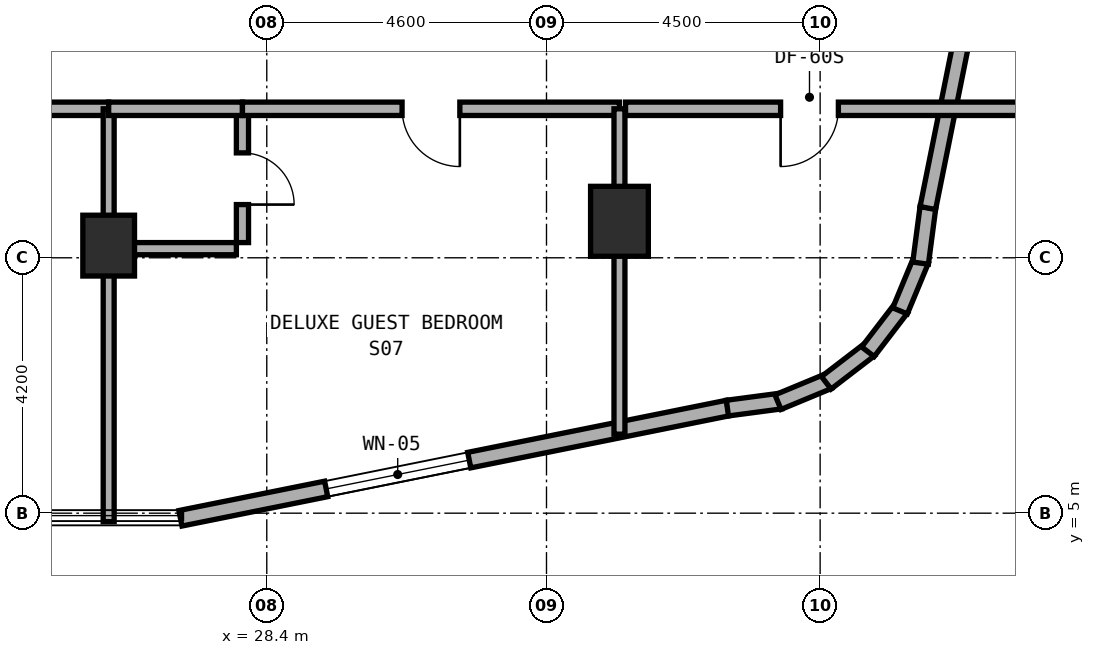
"""IFC4 building model, lengths in metres.
Left out: names, types, materials, properties, quantities, classifications, styles, units other than length and angle.
Written with IfcOpenShell. Run it as: python <this file> out.ifc"""

import sys

from ifc_helpers import new_model, si_unit, direction, frame, frame_2d, origin, origin_2d, place, context, subcontext, project, spatial, rectangle, extrude, element, fill, save


model = new_model("IFC4")
c1 = context("Model", 3, precision=1e-05, world=origin(), true_north=direction((0.0, 1.0)))
c2 = subcontext(c1, "Body", "Model", "MODEL_VIEW")
j1 = project(units=[si_unit("LENGTHUNIT", "METRE"), si_unit("PLANEANGLEUNIT", "RADIAN")], contexts=[c1])
p1 = place(None, origin())
s1 = spatial("IfcSite", under=j1, at=p1, CompositionType="ELEMENT")
p2 = place(p1, origin())
s2 = spatial("IfcBuilding", under=s1, at=p2, CompositionType="ELEMENT")
p3 = place(p2, frame((0.0, 0.0, 98.5)))
s3 = spatial("IfcBuildingStorey", under=s2, at=p3, CompositionType="ELEMENT", Elevation=98.5)
p4 = place(p3, frame((25.8, 9.4, 0.0), z_axis=(0.0, 0.0, 1.0), x_axis=(1.0, 0.0, 0.0)))
e1 = element("IfcColumn", 1, at=p4, inside=s3, PredefinedType="COLUMN", context=c2, shape_type="SweptSolid", body=[
    extrude(rectangle(XDim=0.85, YDim=1.0, at=origin_2d()), origin(), (0.0, 0.0, 1.0), 3.5),
])
p5 = place(p3, frame((34.2, 9.8, 0.0), z_axis=(0.0, 0.0, 1.0), x_axis=(1.0, 0.0, 0.0)))
e2 = element("IfcColumn", 2, at=p5, inside=s3, PredefinedType="COLUMN", context=c2, shape_type="SweptSolid", body=[
    extrude(rectangle(XDim=0.95, YDim=1.15, at=origin_2d()), origin(), (0.0, 0.0, 1.0), 3.5),
])
p6 = place(p3, frame((26.98, 4.916, 0.0), z_axis=(0.0, 0.0, 1.0), x_axis=(0.980315963543, 0.197435082048, 0.0)))
e3 = element("IfcWall", 3, at=p6, inside=s3, PredefinedType="STANDARD", context=c2, shape_type="SweptSolid", body=[
    extrude(rectangle(XDim=9.183, YDim=0.26, at=frame_2d((4.591, 0.0))), origin(), (0.0, 0.0, 1.0), 3.22),
])
p7 = place(p6, frame((2.445, 0.0, 0.8)))
e4 = element("IfcOpeningElement", 4, at=p7, cuts=e3, PredefinedType="OPENING", context=c2, shape_type="SweptSolid", body=[
    extrude(rectangle(XDim=2.4, YDim=1.6, at=frame_2d((1.2, 0.8))), frame((0.0, 0.14, 0.0), z_axis=(0.0, -1.0, 0.0), x_axis=(1.0, 0.0, 0.0)), (0.0, 0.0, 1.0), 0.28),
])
p8 = place(p3, frame((35.975, 6.728, 0.0), z_axis=(0.0, 0.0, 1.0), x_axis=(0.991388484223, 0.130953706898, 0.0)))
e5 = element("IfcWall", 5, at=p8, inside=s3, PredefinedType="STANDARD", context=c2, shape_type="SweptSolid", body=[
    extrude(rectangle(XDim=0.885, YDim=0.26, at=frame_2d((0.443, 0.0))), origin(), (0.0, 0.0, 1.0), 3.22),
])
p9 = place(p3, frame((36.807, 6.826, 0.0), z_axis=(0.0, 0.0, 1.0), x_axis=(0.923627776508, 0.383290660547, 0.0)))
e6 = element("IfcWall", 6, at=p9, inside=s3, PredefinedType="STANDARD", context=c2, shape_type="SweptSolid", body=[
    extrude(rectangle(XDim=0.903, YDim=0.26, at=frame_2d((0.452, 0.0))), origin(), (0.0, 0.0, 1.0), 3.22),
])
p10 = place(p3, frame((37.601, 7.144, 0.0), z_axis=(0.0, 0.0, 1.0), x_axis=(0.793458244748, 0.608624690463, 0.0)))
e7 = element("IfcWall", 7, at=p10, inside=s3, PredefinedType="STANDARD", context=c2, shape_type="SweptSolid", body=[
    extrude(rectangle(XDim=0.902, YDim=0.26, at=frame_2d((0.451, 0.0))), origin(), (0.0, 0.0, 1.0), 3.22),
])
p11 = place(p3, frame((38.286, 7.655, 0.0), z_axis=(0.0, 0.0, 1.0), x_axis=(0.608494022858, 0.793558456666, 0.0)))
e8 = element("IfcWall", 8, at=p11, inside=s3, PredefinedType="STANDARD", context=c2, shape_type="SweptSolid", body=[
    extrude(rectangle(XDim=0.902, YDim=0.26, at=frame_2d((0.451, 0.0))), origin(), (0.0, 0.0, 1.0), 3.22),
])
p12 = place(p3, frame((38.814, 8.327, 0.0), z_axis=(0.0, 0.0, 1.0), x_axis=(0.383155708213, 0.923683767999, 0.0)))
e9 = element("IfcWall", 9, at=p12, inside=s3, PredefinedType="STANDARD", context=c2, shape_type="SweptSolid", body=[
    extrude(rectangle(XDim=0.903, YDim=0.26, at=frame_2d((0.451, 0.0))), origin(), (0.0, 0.0, 1.0), 3.22),
])
p13 = place(p3, frame((39.152, 9.112, 0.0), z_axis=(0.0, 0.0, 1.0), x_axis=(0.130200706103, 0.991487658083, 0.0)))
e10 = element("IfcWall", 10, at=p13, inside=s3, PredefinedType="STANDARD", context=c2, shape_type="SweptSolid", body=[
    extrude(rectangle(XDim=0.921, YDim=0.26, at=frame_2d((0.46, 0.0))), origin(), (0.0, 0.0, 1.0), 3.22),
])
p14 = place(p3, frame((39.271, 10.018, 0.0), z_axis=(0.0, 0.0, 1.0), x_axis=(0.197435082048, 0.980315963543, 0.0)))
e11 = element("IfcWall", 11, at=p14, inside=s3, PredefinedType="STANDARD", context=c2, shape_type="SweptSolid", body=[
    extrude(rectangle(XDim=9.183, YDim=0.26, at=frame_2d((4.591, 0.0))), origin(), (0.0, 0.0, 1.0), 3.22),
])
p15 = place(p14, frame((4.286, 0.0, 0.8)))
e12 = element("IfcOpeningElement", 12, at=p15, cuts=e11, PredefinedType="OPENING", context=c2, shape_type="SweptSolid", body=[
    extrude(rectangle(XDim=2.4, YDim=1.6, at=frame_2d((1.2, 0.8))), frame((0.0, 0.14, 0.0), z_axis=(0.0, -1.0, 0.0), x_axis=(1.0, 0.0, 0.0)), (0.0, 0.0, 1.0), 0.28),
])
p16 = place(p3, frame((18.4, 11.65, 0.0), z_axis=(0.0, 0.0, 1.0), x_axis=(1.0, 0.0, 0.0)))
e13 = element("IfcWall", 13, at=p16, inside=s3, PredefinedType="SOLIDWALL", context=c2, shape_type="SweptSolid", body=[
    extrude(rectangle(XDim=7.4, YDim=0.22, at=frame_2d((3.7, 0.0))), origin(), (0.0, 0.0, 1.0), 2.595),
])
p17 = place(p16, frame((3.225, 0.0, 0.0)))
e14 = element("IfcOpeningElement", 14, at=p17, cuts=e13, PredefinedType="OPENING", context=c2, shape_type="SweptSolid", body=[
    extrude(rectangle(XDim=0.95, YDim=2.1, at=frame_2d((0.475, 1.05))), frame((0.0, 0.12, 0.0), z_axis=(0.0, -1.0, 0.0), x_axis=(1.0, 0.0, 0.0)), (0.0, 0.0, 1.0), 0.24),
])
p18 = place(p3, frame((25.8, 4.86, 0.0), z_axis=(0.0, 0.0, 1.0), x_axis=(0.0, 1.0, 0.0)))
e15 = element("IfcWall", 15, at=p18, inside=s3, PredefinedType="SOLIDWALL", context=c2, shape_type="SweptSolid", body=[
    extrude(rectangle(XDim=6.79, YDim=0.18, at=frame_2d((3.395, 0.0))), origin(), (0.0, 0.0, 1.0), 2.595),
])
p19 = place(p3, frame((28.0, 9.45, 0.0), z_axis=(0.0, 0.0, 1.0), x_axis=(0.0, 1.0, 0.0)))
e16 = element("IfcWall", 16, at=p19, inside=s3, PredefinedType="PLUMBINGWALL", context=c2, shape_type="SweptSolid", body=[
    extrude(rectangle(XDim=2.1, YDim=0.2, at=frame_2d((1.05, 0.0))), origin(), (0.0, 0.0, 1.0), 2.835),
])
p20 = place(p19, frame((0.625, 0.0, 0.0)))
e17 = element("IfcOpeningElement", 17, at=p20, cuts=e16, PredefinedType="OPENING", context=c2, shape_type="SweptSolid", body=[
    extrude(rectangle(XDim=0.85, YDim=2.1, at=frame_2d((0.425, 1.05))), frame((0.0, 0.11, 0.0), z_axis=(0.0, -1.0, 0.0), x_axis=(1.0, 0.0, 0.0)), (0.0, 0.0, 1.0), 0.22),
])
p21 = place(p3, frame((25.9, 9.35, 0.0), z_axis=(0.0, 0.0, 1.0), x_axis=(1.0, 0.0, 0.0)))
e18 = element("IfcWall", 18, at=p21, inside=s3, PredefinedType="PLUMBINGWALL", context=c2, shape_type="SweptSolid", body=[
    extrude(rectangle(XDim=2.0, YDim=0.2, at=frame_2d((1.0, 0.0))), origin(), (0.0, 0.0, 1.0), 2.835),
])
p22 = place(p3, frame((25.8, 11.65, 0.0), z_axis=(0.0, 0.0, 1.0), x_axis=(1.0, 0.0, 0.0)))
e19 = element("IfcWall", 19, at=p22, inside=s3, PredefinedType="SOLIDWALL", context=c2, shape_type="SweptSolid", body=[
    extrude(rectangle(XDim=2.2, YDim=0.22, at=frame_2d((1.1, 0.0))), origin(), (0.0, 0.0, 1.0), 2.595),
])
p23 = place(p3, frame((28.0, 11.65, 0.0), z_axis=(0.0, 0.0, 1.0), x_axis=(1.0, 0.0, 0.0)))
e20 = element("IfcWall", 20, at=p23, inside=s3, PredefinedType="SOLIDWALL", context=c2, shape_type="SweptSolid", body=[
    extrude(rectangle(XDim=6.2, YDim=0.22, at=frame_2d((3.1, 0.0))), origin(), (0.0, 0.0, 1.0), 2.595),
])
p24 = place(p23, frame((2.625, 0.0, 0.0)))
e21 = element("IfcOpeningElement", 21, at=p24, cuts=e20, PredefinedType="OPENING", context=c2, shape_type="SweptSolid", body=[
    extrude(rectangle(XDim=0.95, YDim=2.1, at=frame_2d((0.475, 1.05))), frame((0.0, 0.12, 0.0), z_axis=(0.0, -1.0, 0.0), x_axis=(1.0, 0.0, 0.0)), (0.0, 0.0, 1.0), 0.24),
])
p25 = place(p3, frame((34.2, 6.299, 0.0), z_axis=(0.0, 0.0, 1.0), x_axis=(0.0, 1.0, 0.0)))
e22 = element("IfcWall", 22, at=p25, inside=s3, PredefinedType="SOLIDWALL", context=c2, shape_type="SweptSolid", body=[
    extrude(rectangle(XDim=5.351, YDim=0.18, at=frame_2d((2.675, 0.0))), origin(), (0.0, 0.0, 1.0), 2.595),
])
p26 = place(p3, frame((34.3, 11.65, 0.0), z_axis=(0.0, 0.0, 1.0), x_axis=(1.0, 0.0, 0.0)))
e23 = element("IfcWall", 23, at=p26, inside=s3, PredefinedType="SOLIDWALL", context=c2, shape_type="SweptSolid", body=[
    extrude(rectangle(XDim=6.64, YDim=0.22, at=frame_2d((3.32, 0.0))), origin(), (0.0, 0.0, 1.0), 2.835),
])
p27 = place(p26, frame((2.55, 0.0, 0.0)))
e24 = element("IfcOpeningElement", 24, at=p27, cuts=e23, PredefinedType="OPENING", context=c2, shape_type="SweptSolid", body=[
    extrude(rectangle(XDim=0.95, YDim=2.1, at=frame_2d((0.475, 1.05))), frame((0.0, 0.12, 0.0), z_axis=(0.0, -1.0, 0.0), x_axis=(1.0, 0.0, 0.0)), (0.0, 0.0, 1.0), 0.24),
])
p28 = place(p7, origin())
e25 = element("IfcWindow", 25, at=p28, inside=s3, PartitioningType="SINGLE_PANEL", PredefinedType="WINDOW", context=c2, shape_type="SweptSolid", body=[
    extrude(rectangle(XDim=2.4, YDim=1.6, at=frame_2d((1.2, 0.8))), frame((0.0, 0.03, 0.0), z_axis=(0.0, -1.0, 0.0), x_axis=(1.0, 0.0, 0.0)), (0.0, 0.0, 1.0), 0.06),
])
fill(e4, e25)
p29 = place(p20, frame((0.85, 0.0, 0.0), z_axis=(0.0, 0.0, 1.0), x_axis=(-1.0, 0.0, 0.0)))
e26 = element("IfcDoor", 26, at=p29, inside=s3, OperationType="SINGLE_SWING_RIGHT", PredefinedType="DOOR", context=c2, shape_type="SweptSolid", body=[
    extrude(rectangle(XDim=0.85, YDim=2.1, at=frame_2d((0.425, 1.05))), frame((0.0, 0.025, 0.0), z_axis=(0.0, -1.0, 0.0), x_axis=(1.0, 0.0, 0.0)), (0.0, 0.0, 1.0), 0.05),
])
fill(e17, e26)
p30 = place(p24, frame((0.95, 0.0, 0.0), z_axis=(0.0, 0.0, 1.0), x_axis=(-1.0, 0.0, 0.0)))
e27 = element("IfcDoor", 27, at=p30, inside=s3, OperationType="SINGLE_SWING_LEFT", PredefinedType="DOOR", context=c2, shape_type="SweptSolid", body=[
    extrude(rectangle(XDim=0.95, YDim=2.1, at=frame_2d((0.475, 1.05))), frame((0.0, 0.025, 0.0), z_axis=(0.0, -1.0, 0.0), x_axis=(1.0, 0.0, 0.0)), (0.0, 0.0, 1.0), 0.05),
])
fill(e21, e27)
p31 = place(p27, frame((0.95, 0.0, 0.0), z_axis=(0.0, 0.0, 1.0), x_axis=(-1.0, 0.0, 0.0)))
e28 = element("IfcDoor", 28, at=p31, inside=s3, OperationType="SINGLE_SWING_RIGHT", PredefinedType="DOOR", context=c2, shape_type="SweptSolid", body=[
    extrude(rectangle(XDim=0.95, YDim=2.1, at=frame_2d((0.475, 1.05))), frame((0.0, 0.025, 0.0), z_axis=(0.0, -1.0, 0.0), x_axis=(1.0, 0.0, 0.0)), (0.0, 0.0, 1.0), 0.05),
])
fill(e24, e28)
save(model, sys.argv[1])
